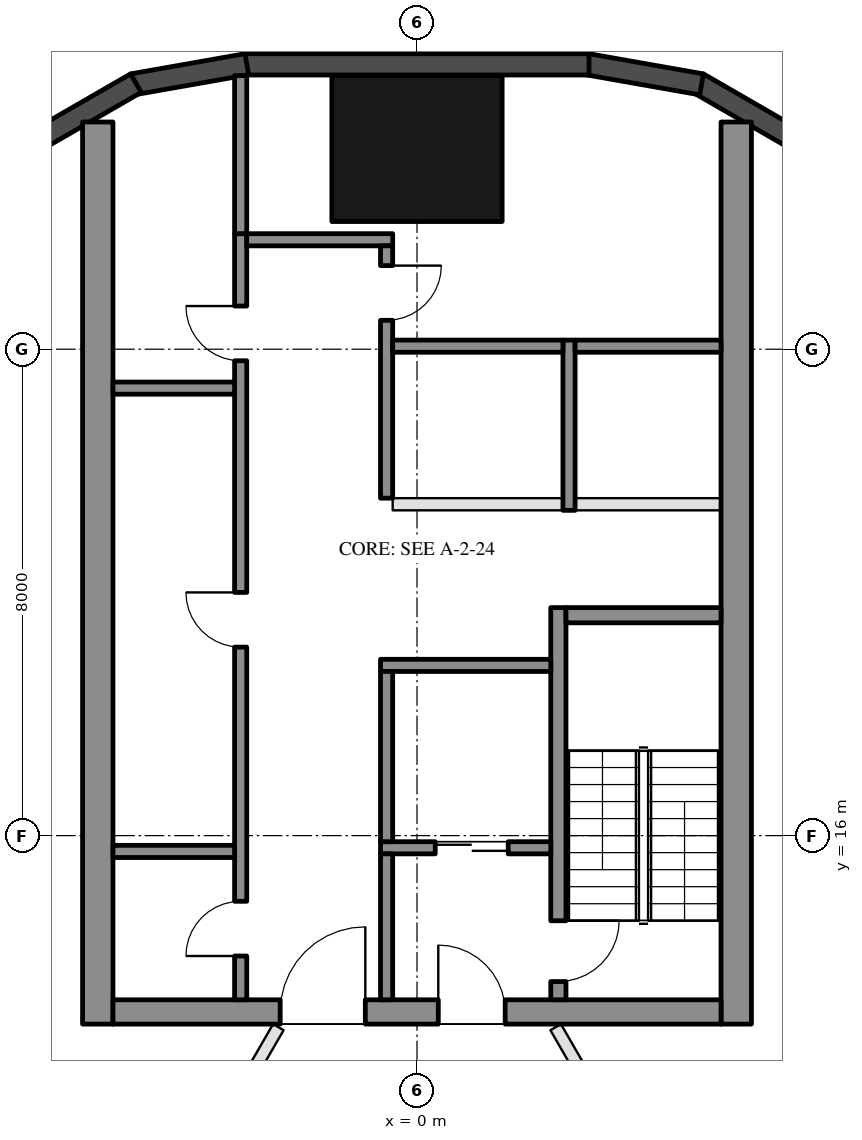
"""IFC4 building model, lengths in metres.
Left out: names, types, materials, properties, quantities, classifications, styles, units other than length and angle.
Written with IfcOpenShell. Run it as: python <this file> out.ifc"""

import sys

from ifc_helpers import new_model, si_unit, direction, frame, frame_2d, origin, origin_2d, place, context, subcontext, project, spatial, rectangle, hollow_rectangle, extrude, element, fill, save


model = new_model("IFC4")
c1 = context("Model", 3, precision=1e-05, world=origin(), true_north=direction((0.0, 1.0)))
c2 = subcontext(c1, "Body", "Model", "MODEL_VIEW")
j1 = project(units=[si_unit("LENGTHUNIT", "METRE"), si_unit("PLANEANGLEUNIT", "RADIAN")], contexts=[c1])
p1 = place(None, origin())
s1 = spatial("IfcSite", under=j1, at=p1, CompositionType="ELEMENT")
p2 = place(p1, origin())
s2 = spatial("IfcBuilding", under=s1, at=p2, CompositionType="ELEMENT")
p3 = place(p2, frame((0.0, 0.0, 109.4)))
s3 = spatial("IfcBuildingStorey", under=s2, at=p3, CompositionType="ELEMENT", Elevation=109.4)
p4 = place(p3, frame((0.0, 27.3, 0.0), z_axis=(0.0, 0.0, 1.0), x_axis=(1.0, 0.0, 0.0)))
e1 = element("IfcColumn", 1, at=p4, inside=s3, PredefinedType="COLUMN", context=c2, shape_type="SweptSolid", body=[
    extrude(hollow_rectangle(XDim=2.8, YDim=2.4, WallThickness=0.07, at=origin_2d()), origin(), (0.0, 0.0, 1.0), 3.7),
])
for number, where, z_axis, x_axis in (
    (2, (6.277, 27.422, 0.0), (0.0, 0.0, 1.0), (-0.866, 0.5, 0.0)),
    (3, (4.68, 28.356, 0.0), (0.0, 0.0, 1.0), (-0.985, 0.174, 0.0)),
):
    element("IfcWall", number, at=place(p3, frame(where, z_axis=z_axis, x_axis=x_axis)), inside=s3, PredefinedType="SOLIDWALL", context=c2, shape_type="SweptSolid", body=[
        extrude(rectangle(XDim=1.91, YDim=0.35, at=frame_2d((0.955, 0.0))), origin(), (0.0, 0.0, 1.0), 3.55),
    ])
p5 = place(p3, frame((2.829, 28.685, 0.0), z_axis=(0.0, 0.0, 1.0), x_axis=(-1.0, 0.0, 0.0)))
e4 = element("IfcWall", 4, at=p5, inside=s3, PredefinedType="SOLIDWALL", context=c2, shape_type="SweptSolid", body=[
    extrude(rectangle(XDim=5.658, YDim=0.35, at=frame_2d((2.829, 0.0))), origin(), (0.0, 0.0, 1.0), 3.55),
])
for number, where, z_axis, x_axis in (
    (5, (-2.799, 28.688, 0.0), (0.0, 0.0, 1.0), (-0.985, -0.174, 0.0)),
    (6, (-4.623, 28.377, 0.0), (0.0, 0.0, 1.0), (-0.866, -0.5, 0.0)),
):
    element("IfcWall", number, at=place(p3, frame(where, z_axis=z_axis, x_axis=x_axis)), inside=s3, PredefinedType="SOLIDWALL", context=c2, shape_type="SweptSolid", body=[
        extrude(rectangle(XDim=1.91, YDim=0.35, at=frame_2d((0.955, 0.0))), origin(), (0.0, 0.0, 1.0), 3.55),
    ])
for number, where, z_axis, x_axis in (
    (7, (5.25, 12.9, 0.0), (0.0, 0.0, 1.0), (0.0, 1.0, 0.0)),
    (8, (-5.25, 12.9, 0.0), (0.0, 0.0, 1.0), (0.0, 1.0, 0.0)),
):
    element("IfcWall", number, at=place(p3, frame(where, z_axis=z_axis, x_axis=x_axis)), inside=s3, PredefinedType="SHEAR", context=c2, shape_type="SweptSolid", body=[
        extrude(rectangle(XDim=14.837, YDim=0.5, at=frame_2d((7.418, 0.0))), origin(), (0.0, 0.0, 1.0), 3.5),
    ])
p6 = place(p3, frame((5.0, 13.1, 0.0), z_axis=(0.0, 0.0, 1.0), x_axis=(-1.0, 0.0, 0.0)))
e9 = element("IfcWall", 9, at=p6, inside=s3, PredefinedType="SHEAR", context=c2, shape_type="SweptSolid", body=[
    extrude(rectangle(XDim=10.0, YDim=0.4, at=frame_2d((5.0, 0.0))), origin(), (0.0, 0.0, 1.0), 3.5),
])
p7 = place(p6, frame((3.55, 0.0, 0.0)))
e10 = element("IfcOpeningElement", 10, at=p7, cuts=e9, PredefinedType="OPENING", context=c2, shape_type="SweptSolid", body=[
    extrude(rectangle(XDim=1.1, YDim=2.1, at=frame_2d((0.55, 1.05))), frame((0.0, 0.21, 0.0), z_axis=(0.0, -1.0, 0.0), x_axis=(1.0, 0.0, 0.0)), (0.0, 0.0, 1.0), 0.42),
])
p8 = place(p6, frame((5.85, 0.0, 0.0)))
e11 = element("IfcOpeningElement", 11, at=p8, cuts=e9, PredefinedType="OPENING", context=c2, shape_type="SweptSolid", body=[
    extrude(rectangle(XDim=1.4, YDim=2.1, at=frame_2d((0.7, 1.05))), frame((0.0, 0.21, 0.0), z_axis=(0.0, -1.0, 0.0), x_axis=(1.0, 0.0, 0.0)), (0.0, 0.0, 1.0), 0.42),
])
p9 = place(p3, frame((2.325, 13.3, 0.0), z_axis=(0.0, 0.0, 1.0), x_axis=(0.0, 1.0, 0.0)))
e12 = element("IfcWall", 12, at=p9, inside=s3, PredefinedType="SHEAR", context=c2, shape_type="SweptSolid", body=[
    extrude(rectangle(XDim=6.45, YDim=0.25, at=frame_2d((3.225, 0.0))), origin(), (0.0, 0.0, 1.0), 3.5),
])
p10 = place(p9, frame((0.3, 0.0, 0.0)))
e13 = element("IfcOpeningElement", 13, at=p10, cuts=e12, PredefinedType="OPENING", context=c2, shape_type="SweptSolid", body=[
    extrude(rectangle(XDim=1.0, YDim=2.1, at=frame_2d((0.5, 1.05))), frame((0.0, 0.135, 0.0), z_axis=(0.0, -1.0, 0.0), x_axis=(1.0, 0.0, 0.0)), (0.0, 0.0, 1.0), 0.27),
])
p11 = place(p3, frame((5.0, 19.625, 0.0), z_axis=(0.0, 0.0, 1.0), x_axis=(-1.0, 0.0, 0.0)))
e14 = element("IfcWall", 14, at=p11, inside=s3, PredefinedType="SHEAR", context=c2, shape_type="SweptSolid", body=[
    extrude(rectangle(XDim=2.55, YDim=0.25, at=frame_2d((1.275, 0.0))), origin(), (0.0, 0.0, 1.0), 3.5),
])
p12 = place(p3, frame((2.2, 18.8, 0.0), z_axis=(0.0, 0.0, 1.0), x_axis=(-1.0, 0.0, 0.0)))
e15 = element("IfcWall", 15, at=p12, inside=s3, PredefinedType="SHEAR", context=c2, shape_type="SweptSolid", body=[
    extrude(rectangle(XDim=2.8, YDim=0.2, at=frame_2d((1.4, 0.0))), origin(), (0.0, 0.0, 1.0), 3.5),
])
p13 = place(p3, frame((2.2, 15.8, 0.0), z_axis=(0.0, 0.0, 1.0), x_axis=(-1.0, 0.0, 0.0)))
e16 = element("IfcWall", 16, at=p13, inside=s3, PredefinedType="SHEAR", context=c2, shape_type="SweptSolid", body=[
    extrude(rectangle(XDim=2.8, YDim=0.2, at=frame_2d((1.4, 0.0))), origin(), (0.0, 0.0, 1.0), 3.5),
])
p14 = place(p13, frame((0.7, 0.0, 0.0)))
e17 = element("IfcOpeningElement", 17, at=p14, cuts=e16, PredefinedType="OPENING", context=c2, shape_type="SweptSolid", body=[
    extrude(rectangle(XDim=1.2, YDim=2.1, at=frame_2d((0.6, 1.05))), frame((0.0, 0.11, 0.0), z_axis=(0.0, -1.0, 0.0), x_axis=(1.0, 0.0, 0.0)), (0.0, 0.0, 1.0), 0.22),
])
p15 = place(p3, frame((-0.5, 15.9, 0.0), z_axis=(0.0, 0.0, 1.0), x_axis=(0.0, 1.0, 0.0)))
e18 = element("IfcWall", 18, at=p15, inside=s3, PredefinedType="SHEAR", context=c2, shape_type="SweptSolid", body=[
    extrude(rectangle(XDim=2.8, YDim=0.2, at=frame_2d((1.4, 0.0))), origin(), (0.0, 0.0, 1.0), 3.5),
])
p16 = place(p3, frame((-0.5, 13.3, 0.0), z_axis=(0.0, 0.0, 1.0), x_axis=(0.0, 1.0, 0.0)))
e19 = element("IfcWall", 19, at=p16, inside=s3, PredefinedType="SHEAR", context=c2, shape_type="SweptSolid", body=[
    extrude(rectangle(XDim=2.4, YDim=0.2, at=frame_2d((1.2, 0.0))), origin(), (0.0, 0.0, 1.0), 3.5),
])
p17 = place(p3, frame((-2.9, 13.3, 0.0), z_axis=(0.0, 0.0, 1.0), x_axis=(0.0, 1.0, 0.0)))
e20 = element("IfcWall", 20, at=p17, inside=s3, PredefinedType="SHEAR", context=c2, shape_type="SweptSolid", body=[
    extrude(rectangle(XDim=12.6, YDim=0.2, at=frame_2d((6.3, 0.0))), origin(), (0.0, 0.0, 1.0), 3.5),
])
p18 = place(p17, frame((0.72, 0.0, 0.0)))
e21 = element("IfcOpeningElement", 21, at=p18, cuts=e20, PredefinedType="OPENING", context=c2, shape_type="SweptSolid", body=[
    extrude(rectangle(XDim=0.9, YDim=2.1, at=frame_2d((0.45, 1.05))), frame((0.0, 0.11, 0.0), z_axis=(0.0, -1.0, 0.0), x_axis=(1.0, 0.0, 0.0)), (0.0, 0.0, 1.0), 0.22),
])
p19 = place(p17, frame((5.8, 0.0, 0.0)))
e22 = element("IfcOpeningElement", 22, at=p19, cuts=e20, PredefinedType="OPENING", context=c2, shape_type="SweptSolid", body=[
    extrude(rectangle(XDim=0.9, YDim=2.1, at=frame_2d((0.45, 1.05))), frame((0.0, 0.11, 0.0), z_axis=(0.0, -1.0, 0.0), x_axis=(1.0, 0.0, 0.0)), (0.0, 0.0, 1.0), 0.22),
])
p20 = place(p17, frame((10.51, 0.0, 0.0)))
e23 = element("IfcOpeningElement", 23, at=p20, cuts=e20, PredefinedType="OPENING", context=c2, shape_type="SweptSolid", body=[
    extrude(rectangle(XDim=0.9, YDim=2.1, at=frame_2d((0.45, 1.05))), frame((0.0, 0.11, 0.0), z_axis=(0.0, -1.0, 0.0), x_axis=(1.0, 0.0, 0.0)), (0.0, 0.0, 1.0), 0.22),
])
p21 = place(p3, frame((-0.4, 25.8, 0.0), z_axis=(0.0, 0.0, 1.0), x_axis=(-1.0, 0.0, 0.0)))
e24 = element("IfcWall", 24, at=p21, inside=s3, PredefinedType="SHEAR", context=c2, shape_type="SweptSolid", body=[
    extrude(rectangle(XDim=2.4, YDim=0.2, at=frame_2d((1.2, 0.0))), origin(), (0.0, 0.0, 1.0), 3.5),
])
p22 = place(p3, frame((-0.5, 21.55, 0.0), z_axis=(0.0, 0.0, 1.0), x_axis=(0.0, 1.0, 0.0)))
e25 = element("IfcWall", 25, at=p22, inside=s3, PredefinedType="SHEAR", context=c2, shape_type="SweptSolid", body=[
    extrude(rectangle(XDim=4.15, YDim=0.2, at=frame_2d((2.075, 0.0))), origin(), (0.0, 0.0, 1.0), 3.5),
])
p23 = place(p22, frame((2.925, 0.0, 0.0)))
e26 = element("IfcOpeningElement", 26, at=p23, cuts=e25, PredefinedType="OPENING", context=c2, shape_type="SweptSolid", body=[
    extrude(rectangle(XDim=0.9, YDim=2.1, at=frame_2d((0.45, 1.05))), frame((0.0, 0.11, 0.0), z_axis=(0.0, -1.0, 0.0), x_axis=(1.0, 0.0, 0.0)), (0.0, 0.0, 1.0), 0.22),
])
for number, where, z_axis, x_axis in (
    (27, (-3.0, 15.74, 0.0), (0.0, 0.0, 1.0), (-1.0, 0.0, 0.0)),
    (28, (-3.0, 23.36, 0.0), (0.0, 0.0, 1.0), (-1.0, 0.0, 0.0)),
):
    element("IfcWall", number, at=place(p3, frame(where, z_axis=z_axis, x_axis=x_axis)), inside=s3, PredefinedType="SHEAR", context=c2, shape_type="SweptSolid", body=[
        extrude(rectangle(XDim=2.0, YDim=0.2, at=frame_2d((1.0, 0.0))), origin(), (0.0, 0.0, 1.0), 3.5),
    ])
p24 = place(p3, frame((-2.9, 25.9, 0.0), z_axis=(0.0, 0.0, 1.0), x_axis=(0.0, 1.0, 0.0)))
e29 = element("IfcWall", 29, at=p24, inside=s3, PredefinedType="SHEAR", context=c2, shape_type="SweptSolid", body=[
    extrude(rectangle(XDim=2.6, YDim=0.2, at=frame_2d((1.3, 0.0))), origin(), (0.0, 0.0, 1.0), 3.5),
])
p25 = place(p3, frame((2.5, 21.35, 0.0), z_axis=(0.0, 0.0, 1.0), x_axis=(0.0, 1.0, 0.0)))
e30 = element("IfcWall", 30, at=p25, inside=s3, PredefinedType="SHEAR", context=c2, shape_type="SweptSolid", body=[
    extrude(rectangle(XDim=2.8, YDim=0.2, at=frame_2d((1.4, 0.0))), origin(), (0.0, 0.0, 1.0), 3.5),
])
p26 = place(p3, frame((5.0, 24.05, 0.0), z_axis=(0.0, 0.0, 1.0), x_axis=(-1.0, 0.0, 0.0)))
e31 = element("IfcWall", 31, at=p26, inside=s3, PredefinedType="SHEAR", context=c2, shape_type="SweptSolid", body=[
    extrude(rectangle(XDim=2.4, YDim=0.2, at=frame_2d((1.2, 0.0))), origin(), (0.0, 0.0, 1.0), 3.5),
])
p27 = place(p3, frame((2.4, 24.05, 0.0), z_axis=(0.0, 0.0, 1.0), x_axis=(-1.0, 0.0, 0.0)))
e32 = element("IfcWall", 32, at=p27, inside=s3, PredefinedType="SHEAR", context=c2, shape_type="SweptSolid", body=[
    extrude(rectangle(XDim=2.8, YDim=0.2, at=frame_2d((1.4, 0.0))), origin(), (0.0, 0.0, 1.0), 3.5),
])
p28 = place(p3, frame((5.0, 21.45, 0.0), z_axis=(0.0, 0.0, 1.0), x_axis=(-1.0, 0.0, 0.0)))
e33 = element("IfcWall", 33, at=p28, inside=s3, PredefinedType="PARTITIONING", context=c2, shape_type="SweptSolid", body=[
    extrude(rectangle(XDim=2.4, YDim=0.2, at=frame_2d((1.2, 0.0))), origin(), (0.0, 0.0, 1.0), 3.5),
])
p29 = place(p3, frame((2.4, 21.45, 0.0), z_axis=(0.0, 0.0, 1.0), x_axis=(-1.0, 0.0, 0.0)))
e34 = element("IfcWall", 34, at=p29, inside=s3, PredefinedType="PARTITIONING", context=c2, shape_type="SweptSolid", body=[
    extrude(rectangle(XDim=2.8, YDim=0.2, at=frame_2d((1.4, 0.0))), origin(), (0.0, 0.0, 1.0), 3.5),
])
p30 = place(p3, frame((15.097, 12.411, 0.0), z_axis=(0.0, 0.0, 1.0), x_axis=(-0.866027479907, -0.499996404033, 0.0)))
e35 = element("IfcWall", 35, at=p30, inside=s3, PredefinedType="PARTITIONING", context=c2, shape_type="SweptSolid", body=[
    extrude(rectangle(XDim=10.98, YDim=0.2, at=frame_2d((5.49, 0.0))), origin(), (0.0, 0.0, 1.0), 2.96),
])
p31 = place(p3, frame((2.281, 12.85, 0.0), z_axis=(0.0, 0.0, 1.0), x_axis=(0.499982611572, -0.866035442765, 0.0)))
e36 = element("IfcWall", 36, at=p31, inside=s3, PredefinedType="PARTITIONING", context=c2, shape_type="SweptSolid", body=[
    extrude(rectangle(XDim=6.688, YDim=0.2, at=frame_2d((3.344, 0.0))), origin(), (0.0, 0.0, 1.0), 2.95),
])
p32 = place(p31, frame((2.844, 0.0, 0.0)))
e37 = element("IfcOpeningElement", 37, at=p32, cuts=e36, PredefinedType="OPENING", context=c2, shape_type="SweptSolid", body=[
    extrude(rectangle(XDim=1.0, YDim=2.1, at=frame_2d((0.5, 1.05))), frame((0.0, 0.11, 0.0), z_axis=(0.0, -1.0, 0.0), x_axis=(1.0, 0.0, 0.0)), (0.0, 0.0, 1.0), 0.22),
])
p33 = place(p3, frame((-6.625, 5.326, 0.0), z_axis=(0.0, 0.0, 1.0), x_axis=(0.499980288617, 0.866036783858, 0.0)))
e38 = element("IfcWall", 38, at=p33, inside=s3, PredefinedType="PARTITIONING", context=c2, shape_type="SweptSolid", body=[
    extrude(rectangle(XDim=8.688, YDim=0.2, at=frame_2d((4.344, 0.0))), origin(), (0.0, 0.0, 1.0), 2.95),
])
p34 = place(p33, frame((3.844, 0.0, 0.0)))
e39 = element("IfcOpeningElement", 39, at=p34, cuts=e38, PredefinedType="OPENING", context=c2, shape_type="SweptSolid", body=[
    extrude(rectangle(XDim=1.0, YDim=2.1, at=frame_2d((0.5, 1.05))), frame((0.0, 0.11, 0.0), z_axis=(0.0, -1.0, 0.0), x_axis=(1.0, 0.0, 0.0)), (0.0, 0.0, 1.0), 0.22),
])
p35 = place(p14, origin())
e40 = element("IfcDoor", 40, at=p35, inside=s3, OperationType="DOUBLE_DOOR_SLIDING", PredefinedType="DOOR", context=c2, shape_type="SweptSolid", body=[
    extrude(rectangle(XDim=1.2, YDim=2.1, at=frame_2d((0.6, 1.05))), frame((0.0, 0.025, 0.0), z_axis=(0.0, -1.0, 0.0), x_axis=(1.0, 0.0, 0.0)), (0.0, 0.0, 1.0), 0.05),
])
fill(e17, e40)
p36 = place(p18, origin())
e41 = element("IfcDoor", 41, at=p36, inside=s3, OperationType="SINGLE_SWING_LEFT", PredefinedType="DOOR", context=c2, shape_type="SweptSolid", body=[
    extrude(rectangle(XDim=0.9, YDim=2.1, at=frame_2d((0.45, 1.05))), frame((0.0, 0.025, 0.0), z_axis=(0.0, -1.0, 0.0), x_axis=(1.0, 0.0, 0.0)), (0.0, 0.0, 1.0), 0.05),
])
fill(e21, e41)
p37 = place(p19, origin())
e42 = element("IfcDoor", 42, at=p37, inside=s3, OperationType="SINGLE_SWING_RIGHT", PredefinedType="DOOR", context=c2, shape_type="SweptSolid", body=[
    extrude(rectangle(XDim=0.9, YDim=2.1, at=frame_2d((0.45, 1.05))), frame((0.0, 0.025, 0.0), z_axis=(0.0, -1.0, 0.0), x_axis=(1.0, 0.0, 0.0)), (0.0, 0.0, 1.0), 0.05),
])
fill(e22, e42)
p38 = place(p20, origin())
e43 = element("IfcDoor", 43, at=p38, inside=s3, OperationType="SINGLE_SWING_RIGHT", PredefinedType="DOOR", context=c2, shape_type="SweptSolid", body=[
    extrude(rectangle(XDim=0.9, YDim=2.1, at=frame_2d((0.45, 1.05))), frame((0.0, 0.025, 0.0), z_axis=(0.0, -1.0, 0.0), x_axis=(1.0, 0.0, 0.0)), (0.0, 0.0, 1.0), 0.05),
])
fill(e23, e43)
p39 = place(p23, frame((0.9, 0.0, 0.0), z_axis=(0.0, 0.0, 1.0), x_axis=(-1.0, 0.0, 0.0)))
e44 = element("IfcDoor", 44, at=p39, inside=s3, OperationType="SINGLE_SWING_LEFT", PredefinedType="DOOR", context=c2, shape_type="SweptSolid", body=[
    extrude(rectangle(XDim=0.9, YDim=2.1, at=frame_2d((0.45, 1.05))), frame((0.0, 0.025, 0.0), z_axis=(0.0, -1.0, 0.0), x_axis=(1.0, 0.0, 0.0)), (0.0, 0.0, 1.0), 0.05),
])
fill(e26, e44)
p40 = place(p7, frame((1.1, 0.0, 0.0), z_axis=(0.0, 0.0, 1.0), x_axis=(-1.0, 0.0, 0.0)))
e45 = element("IfcDoor", 45, at=p40, inside=s3, OperationType="SINGLE_SWING_LEFT", PredefinedType="DOOR", context=c2, shape_type="SweptSolid", body=[
    extrude(rectangle(XDim=1.1, YDim=2.1, at=frame_2d((0.55, 1.05))), frame((0.0, 0.025, 0.0), z_axis=(0.0, -1.0, 0.0), x_axis=(1.0, 0.0, 0.0)), (0.0, 0.0, 1.0), 0.05),
])
fill(e10, e45)
p41 = place(p8, frame((1.4, 0.0, 0.0), z_axis=(0.0, 0.0, 1.0), x_axis=(-1.0, 0.0, 0.0)))
e46 = element("IfcDoor", 46, at=p41, inside=s3, OperationType="DOUBLE_DOOR_SINGLE_SWING", PredefinedType="DOOR", context=c2, shape_type="SweptSolid", body=[
    extrude(rectangle(XDim=1.4, YDim=2.1, at=frame_2d((0.7, 1.05))), frame((0.0, 0.025, 0.0), z_axis=(0.0, -1.0, 0.0), x_axis=(1.0, 0.0, 0.0)), (0.0, 0.0, 1.0), 0.05),
])
fill(e11, e46)
p42 = place(p10, frame((1.0, 0.0, 0.0), z_axis=(0.0, 0.0, 1.0), x_axis=(-1.0, 0.0, 0.0)))
e47 = element("IfcDoor", 47, at=p42, inside=s3, OperationType="SINGLE_SWING_LEFT", PredefinedType="DOOR", context=c2, shape_type="SweptSolid", body=[
    extrude(rectangle(XDim=1.0, YDim=2.1, at=frame_2d((0.5, 1.05))), frame((0.0, 0.025, 0.0), z_axis=(0.0, -1.0, 0.0), x_axis=(1.0, 0.0, 0.0)), (0.0, 0.0, 1.0), 0.05),
])
fill(e13, e47)
save(model, sys.argv[1])
